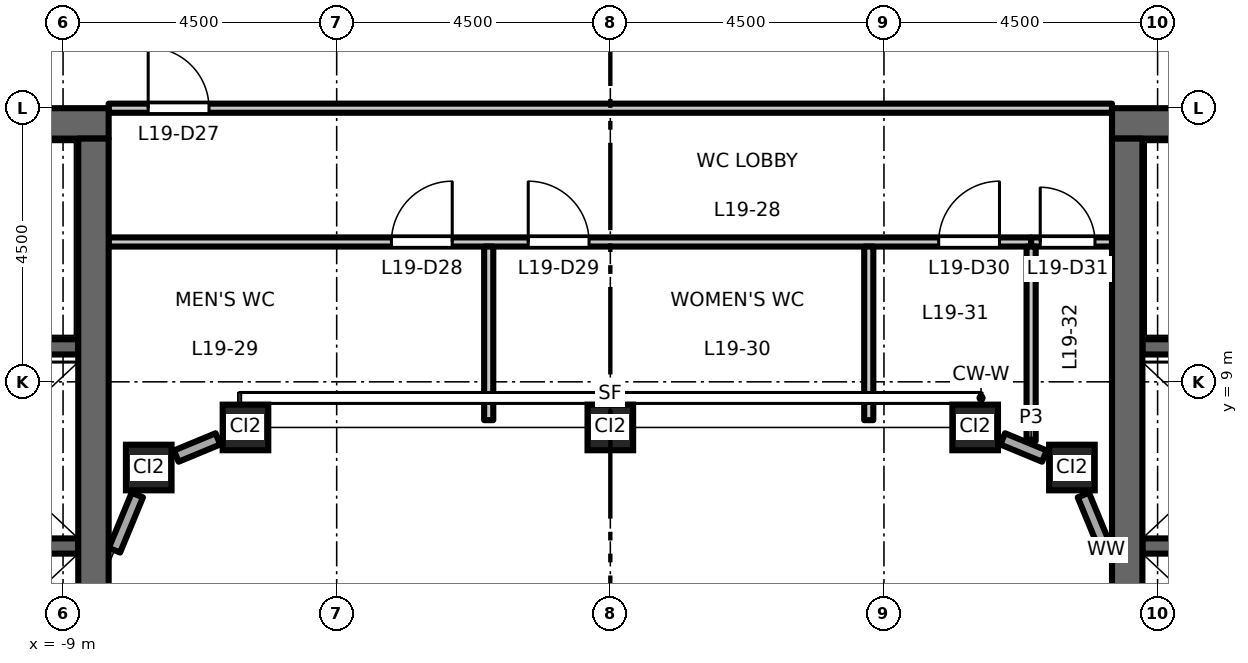
"""IFC4 building model, lengths in metres.
Left out: names, types, materials, properties, quantities, classifications, styles, units other than length and angle.
Written with IfcOpenShell. Run it as: python <this file> out.ifc"""

import sys

from ifc_helpers import new_model, si_unit, direction, frame, frame_2d, origin, origin_2d, place, context, subcontext, project, spatial, rectangle, hollow_rectangle, extrude, element, fill, save


model = new_model("IFC4")
c1 = context("Model", 3, precision=1e-05, world=origin(), true_north=direction((0.0, 1.0)))
c2 = subcontext(c1, "Body", "Model", "MODEL_VIEW")
j1 = project(units=[si_unit("LENGTHUNIT", "METRE"), si_unit("PLANEANGLEUNIT", "RADIAN")], contexts=[c1])
p1 = place(None, origin())
s1 = spatial("IfcSite", under=j1, at=p1, CompositionType="ELEMENT")
p2 = place(p1, origin())
s2 = spatial("IfcBuilding", under=s1, at=p2, CompositionType="ELEMENT")
p3 = place(p2, frame((0.0, 0.0, 89.7)))
s3 = spatial("IfcBuildingStorey", under=s2, at=p3, CompositionType="ELEMENT", Elevation=89.7)
for number, where, z_axis, x_axis in (
    (1, (-7.591, 7.591, 0.0), (0.0, 0.0, 1.0), (1.0, 0.0, 0.0)),
    (2, (-6.0, 8.25, 0.0), (0.0, 0.0, 1.0), (1.0, 0.0, 0.0)),
    (3, (0.0, 8.25, 0.0), (0.0, 0.0, 1.0), (1.0, 0.0, 0.0)),
    (4, (6.0, 8.25, 0.0), (0.0, 0.0, 1.0), (1.0, 0.0, 0.0)),
    (5, (7.591, 7.591, 0.0), (0.0, 0.0, 1.0), (1.0, 0.0, 0.0)),
):
    element("IfcColumn", number, at=place(p3, frame(where, z_axis=z_axis, x_axis=x_axis)), inside=s3, PredefinedType="COLUMN", context=c2, shape_type="SweptSolid", body=[
        extrude(hollow_rectangle(XDim=0.75, YDim=0.75, WallThickness=0.045, at=origin_2d()), origin(), (0.0, 0.0, 1.0), 4.5),
    ])
p4 = place(p3, frame((-8.75, 6.3, 0.0), z_axis=(0.0, 0.0, 1.0), x_axis=(-1.0, 0.0, 0.0)))
e6 = element("IfcWall", 6, at=p4, inside=s3, PredefinedType="SHEAR", context=c2, shape_type="SweptSolid", body=[
    extrude(rectangle(XDim=3.1, YDim=0.25, at=frame_2d((1.55, 0.0))), origin(), (0.0, 0.0, 1.0), 4.3),
])
p5 = place(p3, frame((-8.75, 9.575, 0.0), z_axis=(0.0, 0.0, 1.0), x_axis=(-1.0, 0.0, 0.0)))
e7 = element("IfcWall", 7, at=p5, inside=s3, PredefinedType="SHEAR", context=c2, shape_type="SweptSolid", body=[
    extrude(rectangle(XDim=8.0, YDim=0.25, at=frame_2d((4.0, 0.0))), origin(), (0.0, 0.0, 1.0), 4.3),
])
p6 = place(p5, frame((6.65, 0.0, 0.0)))
e8 = element("IfcOpeningElement", 8, at=p6, cuts=e7, PredefinedType="OPENING", context=c2, shape_type="SweptSolid", body=[
    extrude(rectangle(XDim=1.1, YDim=2.1, at=frame_2d((0.55, 1.05))), frame((0.0, 0.135, 0.0), z_axis=(0.0, -1.0, 0.0), x_axis=(1.0, 0.0, 0.0)), (0.0, 0.0, 1.0), 0.27),
])
p7 = place(p3, frame((-8.25, 13.25, 0.0), z_axis=(0.0, 0.0, 1.0), x_axis=(-1.0, 0.0, 0.0)))
e9 = element("IfcWall", 9, at=p7, inside=s3, PredefinedType="SHEAR", context=c2, shape_type="SweptSolid", body=[
    extrude(rectangle(XDim=13.5, YDim=0.5, at=frame_2d((6.75, 0.0))), origin(), (0.0, 0.0, 1.0), 4.3),
])
p8 = place(p3, frame((-8.5, -13.0, 0.0), z_axis=(0.0, 0.0, 1.0), x_axis=(0.0, 1.0, 0.0)))
e10 = element("IfcWall", 10, at=p8, inside=s3, PredefinedType="SHEAR", context=c2, shape_type="SweptSolid", body=[
    extrude(rectangle(XDim=26.0, YDim=0.5, at=frame_2d((13.0, 0.0))), origin(), (0.0, 0.0, 1.0), 4.3),
])
p9 = place(p3, frame((8.75, 6.3, 0.0), z_axis=(0.0, 0.0, 1.0), x_axis=(1.0, 0.0, 0.0)))
e11 = element("IfcWall", 11, at=p9, inside=s3, PredefinedType="SHEAR", context=c2, shape_type="SweptSolid", body=[
    extrude(rectangle(XDim=3.1, YDim=0.25, at=frame_2d((1.55, 0.0))), origin(), (0.0, 0.0, 1.0), 4.3),
])
p10 = place(p3, frame((8.75, 9.575, 0.0), z_axis=(0.0, 0.0, 1.0), x_axis=(1.0, 0.0, 0.0)))
e12 = element("IfcWall", 12, at=p10, inside=s3, PredefinedType="SHEAR", context=c2, shape_type="SweptSolid", body=[
    extrude(rectangle(XDim=8.0, YDim=0.25, at=frame_2d((4.0, 0.0))), origin(), (0.0, 0.0, 1.0), 4.3),
])
p11 = place(p10, frame((6.65, 0.0, 0.0)))
e13 = element("IfcOpeningElement", 13, at=p11, cuts=e12, PredefinedType="OPENING", context=c2, shape_type="SweptSolid", body=[
    extrude(rectangle(XDim=1.1, YDim=2.1, at=frame_2d((0.55, 1.05))), frame((0.0, 0.135, 0.0), z_axis=(0.0, -1.0, 0.0), x_axis=(1.0, 0.0, 0.0)), (0.0, 0.0, 1.0), 0.27),
])
p12 = place(p3, frame((8.25, 13.25, 0.0), z_axis=(0.0, 0.0, 1.0), x_axis=(1.0, 0.0, 0.0)))
e14 = element("IfcWall", 14, at=p12, inside=s3, PredefinedType="SHEAR", context=c2, shape_type="SweptSolid", body=[
    extrude(rectangle(XDim=13.5, YDim=0.5, at=frame_2d((6.75, 0.0))), origin(), (0.0, 0.0, 1.0), 4.3),
])
p13 = place(p3, frame((8.5, -13.0, 0.0), z_axis=(0.0, 0.0, 1.0), x_axis=(0.0, 1.0, 0.0)))
e15 = element("IfcWall", 15, at=p13, inside=s3, PredefinedType="SHEAR", context=c2, shape_type="SweptSolid", body=[
    extrude(rectangle(XDim=26.0, YDim=0.5, at=frame_2d((13.0, 0.0))), origin(), (0.0, 0.0, 1.0), 4.3),
])
p14 = place(p3, frame((8.154, 6.231, 0.0), z_axis=(0.0, 0.0, 1.0), x_axis=(-0.382549378284, 0.923935048136, 0.0)))
e16 = element("IfcWall", 16, at=p14, inside=s3, PredefinedType="STANDARD", context=c2, shape_type="SweptSolid", body=[
    extrude(rectangle(XDim=0.982, YDim=0.2, at=frame_2d((0.491, 0.0))), origin(), (0.0, 0.0, 1.0), 3.68),
])
for number, where, z_axis, x_axis in (
    (17, (7.138, 7.779, 0.0), (0.0, 0.0, 1.0), (-0.924, 0.383, 0.0)),
    (18, (-6.453, 8.062, 0.0), (0.0, 0.0, 1.0), (-0.924, -0.383, 0.0)),
):
    element("IfcWall", number, at=place(p3, frame(where, z_axis=z_axis, x_axis=x_axis)), inside=s3, PredefinedType="STANDARD", context=c2, shape_type="SweptSolid", body=[
        extrude(rectangle(XDim=0.742, YDim=0.2, at=frame_2d((0.371, 0.0))), origin(), (0.0, 0.0, 1.0), 3.68),
    ])
p15 = place(p3, frame((-7.779, 7.138, 0.0), z_axis=(0.0, 0.0, 1.0), x_axis=(-0.382549378284, -0.923935048136, 0.0)))
e19 = element("IfcWall", 19, at=p15, inside=s3, PredefinedType="STANDARD", context=c2, shape_type="SweptSolid", body=[
    extrude(rectangle(XDim=0.982, YDim=0.2, at=frame_2d((0.491, 0.0))), origin(), (0.0, 0.0, 1.0), 3.68),
])
p16 = place(p3, frame((-8.25, 11.3, 0.0), z_axis=(0.0, 0.0, 1.0), x_axis=(1.0, 0.0, 0.0)))
e20 = element("IfcWall", 20, at=p16, inside=s3, PredefinedType="PARTITIONING", context=c2, shape_type="SweptSolid", body=[
    extrude(rectangle(XDim=15.17, YDim=0.15, at=frame_2d((7.585, 0.0))), origin(), (0.0, 0.0, 1.0), 4.3),
])
p17 = place(p16, frame((4.65, 0.0, 0.0)))
e21 = element("IfcOpeningElement", 21, at=p17, cuts=e20, PredefinedType="OPENING", context=c2, shape_type="SweptSolid", body=[
    extrude(rectangle(XDim=1.0, YDim=2.1, at=frame_2d((0.5, 1.05))), frame((0.0, 0.085, 0.0), z_axis=(0.0, -1.0, 0.0), x_axis=(1.0, 0.0, 0.0)), (0.0, 0.0, 1.0), 0.17),
])
p18 = place(p16, frame((6.9, 0.0, 0.0)))
e22 = element("IfcOpeningElement", 22, at=p18, cuts=e20, PredefinedType="OPENING", context=c2, shape_type="SweptSolid", body=[
    extrude(rectangle(XDim=1.0, YDim=2.1, at=frame_2d((0.5, 1.05))), frame((0.0, 0.085, 0.0), z_axis=(0.0, -1.0, 0.0), x_axis=(1.0, 0.0, 0.0)), (0.0, 0.0, 1.0), 0.17),
])
p19 = place(p16, frame((13.65, 0.0, 0.0)))
e23 = element("IfcOpeningElement", 23, at=p19, cuts=e20, PredefinedType="OPENING", context=c2, shape_type="SweptSolid", body=[
    extrude(rectangle(XDim=1.0, YDim=2.1, at=frame_2d((0.5, 1.05))), frame((0.0, 0.085, 0.0), z_axis=(0.0, -1.0, 0.0), x_axis=(1.0, 0.0, 0.0)), (0.0, 0.0, 1.0), 0.17),
])
p20 = place(p3, frame((6.92, 11.3, 0.0), z_axis=(0.0, 0.0, 1.0), x_axis=(1.0, 0.0, 0.0)))
e24 = element("IfcWall", 24, at=p20, inside=s3, PredefinedType="PARTITIONING", context=c2, shape_type="SweptSolid", body=[
    extrude(rectangle(XDim=1.33, YDim=0.15, at=frame_2d((0.665, 0.0))), origin(), (0.0, 0.0, 1.0), 4.3),
])
p21 = place(p20, frame((0.15, 0.0, 0.0)))
e25 = element("IfcOpeningElement", 25, at=p21, cuts=e24, PredefinedType="OPENING", context=c2, shape_type="SweptSolid", body=[
    extrude(rectangle(XDim=0.9, YDim=2.1, at=frame_2d((0.45, 1.05))), frame((0.0, 0.085, 0.0), z_axis=(0.0, -1.0, 0.0), x_axis=(1.0, 0.0, 0.0)), (0.0, 0.0, 1.0), 0.17),
])
p22 = place(p3, frame((-8.25, 13.5, 0.0), z_axis=(0.0, 0.0, 1.0), x_axis=(1.0, 0.0, 0.0)))
e26 = element("IfcWall", 26, at=p22, inside=s3, PredefinedType="PARTITIONING", context=c2, shape_type="SweptSolid", body=[
    extrude(rectangle(XDim=16.5, YDim=0.15, at=frame_2d((8.25, 0.0))), origin(), (0.0, 0.0, 1.0), 3.8),
])
p23 = place(p22, frame((0.65, 0.0, 0.0)))
e27 = element("IfcOpeningElement", 27, at=p23, cuts=e26, PredefinedType="OPENING", context=c2, shape_type="SweptSolid", body=[
    extrude(rectangle(XDim=1.0, YDim=2.1, at=frame_2d((0.5, 1.05))), frame((0.0, 0.085, 0.0), z_axis=(0.0, -1.0, 0.0), x_axis=(1.0, 0.0, 0.0)), (0.0, 0.0, 1.0), 0.17),
])
for number, where, z_axis, x_axis in (
    (28, (-2.0, 8.37, 0.0), (0.0, 0.0, 1.0), (0.0, 1.0, 0.0)),
    (29, (4.25, 8.37, 0.0), (0.0, 0.0, 1.0), (0.0, 1.0, 0.0)),
):
    element("IfcWall", number, at=place(p3, frame(where, z_axis=z_axis, x_axis=x_axis)), inside=s3, PredefinedType="PARTITIONING", context=c2, shape_type="SweptSolid", body=[
        extrude(rectangle(XDim=2.855, YDim=0.15, at=frame_2d((1.427, 0.0))), origin(), (0.0, 0.0, 1.0), 4.3),
    ])
p24 = place(p3, frame((6.92, 8.028, 0.0), z_axis=(0.0, 0.0, 1.0), x_axis=(0.0, 1.0, 0.0)))
e30 = element("IfcWall", 30, at=p24, inside=s3, PredefinedType="PARTITIONING", context=c2, shape_type="SweptSolid", body=[
    extrude(rectangle(XDim=3.197, YDim=0.15, at=frame_2d((1.599, 0.0))), origin(), (0.0, 0.0, 1.0), 4.3),
])
p25 = place(p23, origin())
e31 = element("IfcDoor", 31, at=p25, inside=s3, OperationType="SINGLE_SWING_LEFT", PredefinedType="DOOR", context=c2, shape_type="SweptSolid", body=[
    extrude(rectangle(XDim=1.0, YDim=2.1, at=frame_2d((0.5, 1.05))), frame((0.0, 0.025, 0.0), z_axis=(0.0, -1.0, 0.0), x_axis=(1.0, 0.0, 0.0)), (0.0, 0.0, 1.0), 0.05),
])
fill(e27, e31)
p26 = place(p17, origin())
e32 = element("IfcDoor", 32, at=p26, inside=s3, OperationType="SINGLE_SWING_RIGHT", PredefinedType="DOOR", context=c2, shape_type="SweptSolid", body=[
    extrude(rectangle(XDim=1.0, YDim=2.1, at=frame_2d((0.5, 1.05))), frame((0.0, 0.025, 0.0), z_axis=(0.0, -1.0, 0.0), x_axis=(1.0, 0.0, 0.0)), (0.0, 0.0, 1.0), 0.05),
])
fill(e21, e32)
p27 = place(p18, origin())
e33 = element("IfcDoor", 33, at=p27, inside=s3, OperationType="SINGLE_SWING_LEFT", PredefinedType="DOOR", context=c2, shape_type="SweptSolid", body=[
    extrude(rectangle(XDim=1.0, YDim=2.1, at=frame_2d((0.5, 1.05))), frame((0.0, 0.025, 0.0), z_axis=(0.0, -1.0, 0.0), x_axis=(1.0, 0.0, 0.0)), (0.0, 0.0, 1.0), 0.05),
])
fill(e22, e33)
p28 = place(p19, origin())
e34 = element("IfcDoor", 34, at=p28, inside=s3, OperationType="SINGLE_SWING_RIGHT", PredefinedType="DOOR", context=c2, shape_type="SweptSolid", body=[
    extrude(rectangle(XDim=1.0, YDim=2.1, at=frame_2d((0.5, 1.05))), frame((0.0, 0.025, 0.0), z_axis=(0.0, -1.0, 0.0), x_axis=(1.0, 0.0, 0.0)), (0.0, 0.0, 1.0), 0.05),
])
fill(e23, e34)
p29 = place(p21, origin())
e35 = element("IfcDoor", 35, at=p29, inside=s3, OperationType="SINGLE_SWING_LEFT", PredefinedType="DOOR", context=c2, shape_type="SweptSolid", body=[
    extrude(rectangle(XDim=0.9, YDim=2.1, at=frame_2d((0.45, 1.05))), frame((0.0, 0.025, 0.0), z_axis=(0.0, -1.0, 0.0), x_axis=(1.0, 0.0, 0.0)), (0.0, 0.0, 1.0), 0.05),
])
fill(e25, e35)
save(model, sys.argv[1])
